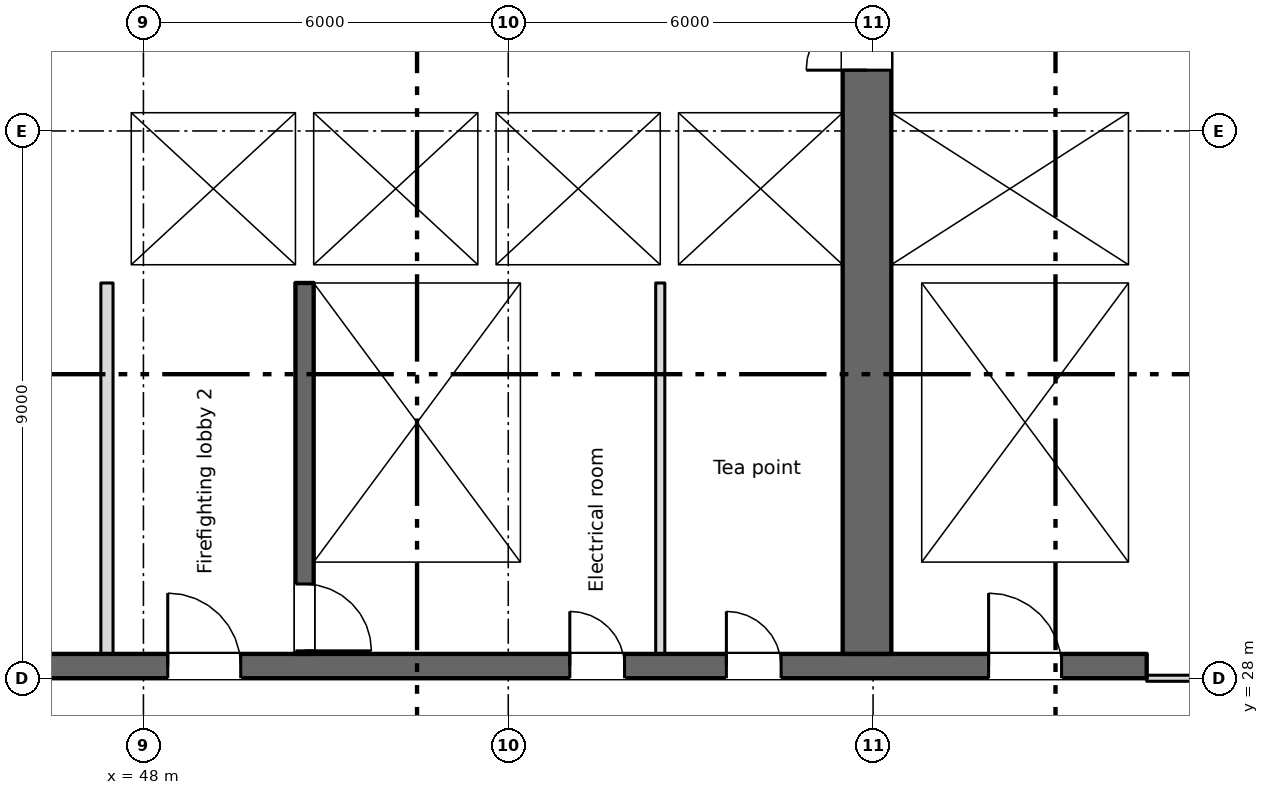
"""IFC4 building model, lengths in metres.
Left out: names, types, materials, properties, quantities, classifications, styles, units other than length and angle.
Written with IfcOpenShell. Run it as: python <this file> out.ifc"""

import sys

from ifc_helpers import new_model, si_unit, direction, frame, frame_2d, origin, place, context, subcontext, project, spatial, rectangle, extrude, element, fill, save


model = new_model("IFC4")
c1 = context("Model", 3, precision=1e-05, world=origin(), true_north=direction((0.0, 1.0)))
c2 = subcontext(c1, "Body", "Model", "MODEL_VIEW")
j1 = project(units=[si_unit("LENGTHUNIT", "METRE"), si_unit("PLANEANGLEUNIT", "RADIAN")], contexts=[c1])
p1 = place(None, origin())
s1 = spatial("IfcSite", under=j1, at=p1, CompositionType="ELEMENT")
p2 = place(p1, origin())
s2 = spatial("IfcBuilding", under=s1, at=p2, CompositionType="ELEMENT")
p3 = place(p2, frame((0.0, 0.0, 136.25)))
s3 = spatial("IfcBuildingStorey", under=s2, at=p3, CompositionType="ELEMENT", Elevation=136.25)
p4 = place(p3, frame((6.7, 28.2, 0.0), z_axis=(0.0, 0.0, 1.0), x_axis=(1.0, 0.0, 0.0)))
e1 = element("IfcWall", 1, at=p4, inside=s3, PredefinedType="SHEAR", context=c2, shape_type="SweptSolid", body=[
    extrude(rectangle(XDim=57.8, YDim=0.4, at=frame_2d((28.9, 0.0))), origin(), (0.0, 0.0, 1.0), 3.35),
])
p5 = place(p4, frame((12.812, 0.0, 0.0)))
e2 = element("IfcOpeningElement", 2, at=p5, cuts=e1, PredefinedType="OPENING", context=c2, shape_type="SweptSolid", body=[
    extrude(rectangle(XDim=0.9, YDim=2.1, at=frame_2d((0.45, 1.05))), frame((0.0, 0.21, 0.0), z_axis=(0.0, -1.0, 0.0), x_axis=(1.0, 0.0, 0.0)), (0.0, 0.0, 1.0), 0.42),
])
p6 = place(p4, frame((15.387, 0.0, 0.0)))
e3 = element("IfcOpeningElement", 3, at=p6, cuts=e1, PredefinedType="OPENING", context=c2, shape_type="SweptSolid", body=[
    extrude(rectangle(XDim=0.9, YDim=2.1, at=frame_2d((0.45, 1.05))), frame((0.0, 0.21, 0.0), z_axis=(0.0, -1.0, 0.0), x_axis=(1.0, 0.0, 0.0)), (0.0, 0.0, 1.0), 0.42),
])
p7 = place(p4, frame((48.312, 0.0, 0.0)))
e4 = element("IfcOpeningElement", 4, at=p7, cuts=e1, PredefinedType="OPENING", context=c2, shape_type="SweptSolid", body=[
    extrude(rectangle(XDim=0.9, YDim=2.1, at=frame_2d((0.45, 1.05))), frame((0.0, 0.21, 0.0), z_axis=(0.0, -1.0, 0.0), x_axis=(1.0, 0.0, 0.0)), (0.0, 0.0, 1.0), 0.42),
])
p8 = place(p4, frame((50.887, 0.0, 0.0)))
e5 = element("IfcOpeningElement", 5, at=p8, cuts=e1, PredefinedType="OPENING", context=c2, shape_type="SweptSolid", body=[
    extrude(rectangle(XDim=0.9, YDim=2.1, at=frame_2d((0.45, 1.05))), frame((0.0, 0.21, 0.0), z_axis=(0.0, -1.0, 0.0), x_axis=(1.0, 0.0, 0.0)), (0.0, 0.0, 1.0), 0.42),
])
p9 = place(p4, frame((0.562, 0.0, 0.0)))
e6 = element("IfcOpeningElement", 6, at=p9, cuts=e1, PredefinedType="OPENING", context=c2, shape_type="SweptSolid", body=[
    extrude(rectangle(XDim=0.9, YDim=2.1, at=frame_2d((0.45, 1.05))), frame((0.0, 0.21, 0.0), z_axis=(0.0, -1.0, 0.0), x_axis=(1.0, 0.0, 0.0)), (0.0, 0.0, 1.0), 0.42),
])
p10 = place(p4, frame((2.137, 0.0, 0.0)))
e7 = element("IfcOpeningElement", 7, at=p10, cuts=e1, PredefinedType="OPENING", context=c2, shape_type="SweptSolid", body=[
    extrude(rectangle(XDim=0.9, YDim=2.1, at=frame_2d((0.45, 1.05))), frame((0.0, 0.21, 0.0), z_axis=(0.0, -1.0, 0.0), x_axis=(1.0, 0.0, 0.0)), (0.0, 0.0, 1.0), 0.42),
])
p11 = place(p4, frame((4.7, 0.0, 0.0)))
e8 = element("IfcOpeningElement", 8, at=p11, cuts=e1, PredefinedType="OPENING", context=c2, shape_type="SweptSolid", body=[
    extrude(rectangle(XDim=1.2, YDim=2.1, at=frame_2d((0.6, 1.05))), frame((0.0, 0.21, 0.0), z_axis=(0.0, -1.0, 0.0), x_axis=(1.0, 0.0, 0.0)), (0.0, 0.0, 1.0), 0.42),
])
p12 = place(p4, frame((31.7, 0.0, 0.0)))
e9 = element("IfcOpeningElement", 9, at=p12, cuts=e1, PredefinedType="OPENING", context=c2, shape_type="SweptSolid", body=[
    extrude(rectangle(XDim=1.2, YDim=2.1, at=frame_2d((0.6, 1.05))), frame((0.0, 0.21, 0.0), z_axis=(0.0, -1.0, 0.0), x_axis=(1.0, 0.0, 0.0)), (0.0, 0.0, 1.0), 0.42),
])
p13 = place(p4, frame((55.2, 0.0, 0.0)))
e10 = element("IfcOpeningElement", 10, at=p13, cuts=e1, PredefinedType="OPENING", context=c2, shape_type="SweptSolid", body=[
    extrude(rectangle(XDim=1.2, YDim=2.1, at=frame_2d((0.6, 1.05))), frame((0.0, 0.21, 0.0), z_axis=(0.0, -1.0, 0.0), x_axis=(1.0, 0.0, 0.0)), (0.0, 0.0, 1.0), 0.42),
])
p14 = place(p4, frame((21.7, 0.0, 0.0)))
e11 = element("IfcOpeningElement", 11, at=p14, cuts=e1, PredefinedType="OPENING", context=c2, shape_type="SweptSolid", body=[
    extrude(rectangle(XDim=1.2, YDim=2.1, at=frame_2d((0.6, 1.05))), frame((0.0, 0.21, 0.0), z_axis=(0.0, -1.0, 0.0), x_axis=(1.0, 0.0, 0.0)), (0.0, 0.0, 1.0), 0.42),
])
p15 = place(p4, frame((41.7, 0.0, 0.0)))
e12 = element("IfcOpeningElement", 12, at=p15, cuts=e1, PredefinedType="OPENING", context=c2, shape_type="SweptSolid", body=[
    extrude(rectangle(XDim=1.2, YDim=2.1, at=frame_2d((0.6, 1.05))), frame((0.0, 0.21, 0.0), z_axis=(0.0, -1.0, 0.0), x_axis=(1.0, 0.0, 0.0)), (0.0, 0.0, 1.0), 0.42),
])
p16 = place(p4, frame((24.85, 0.0, 0.0)))
e13 = element("IfcOpeningElement", 13, at=p16, cuts=e1, PredefinedType="OPENING", context=c2, shape_type="SweptSolid", body=[
    extrude(rectangle(XDim=2.4, YDim=2.1, at=frame_2d((1.2, 1.05))), frame((0.0, 0.21, 0.0), z_axis=(0.0, -1.0, 0.0), x_axis=(1.0, 0.0, 0.0)), (0.0, 0.0, 1.0), 0.42),
])
p17 = place(p4, frame((37.35, 0.0, 0.0)))
e14 = element("IfcOpeningElement", 14, at=p17, cuts=e1, PredefinedType="OPENING", context=c2, shape_type="SweptSolid", body=[
    extrude(rectangle(XDim=2.4, YDim=2.1, at=frame_2d((1.2, 1.05))), frame((0.0, 0.21, 0.0), z_axis=(0.0, -1.0, 0.0), x_axis=(1.0, 0.0, 0.0)), (0.0, 0.0, 1.0), 0.42),
])
p18 = place(p4, frame((7.95, 0.0, 0.0)))
e15 = element("IfcOpeningElement", 15, at=p18, cuts=e1, PredefinedType="OPENING", context=c2, shape_type="SweptSolid", body=[
    extrude(rectangle(XDim=2.4, YDim=2.1, at=frame_2d((1.2, 1.05))), frame((0.0, 0.21, 0.0), z_axis=(0.0, -1.0, 0.0), x_axis=(1.0, 0.0, 0.0)), (0.0, 0.0, 1.0), 0.42),
])
p19 = place(p4, frame((28.85, 0.0, 0.0)))
e16 = element("IfcOpeningElement", 16, at=p19, cuts=e1, PredefinedType="OPENING", context=c2, shape_type="SweptSolid", body=[
    extrude(rectangle(XDim=0.9, YDim=2.1, at=frame_2d((0.45, 1.05))), frame((0.0, 0.21, 0.0), z_axis=(0.0, -1.0, 0.0), x_axis=(1.0, 0.0, 0.0)), (0.0, 0.0, 1.0), 0.42),
])
p20 = place(p4, frame((34.85, 0.0, 0.0)))
e17 = element("IfcOpeningElement", 17, at=p20, cuts=e1, PredefinedType="OPENING", context=c2, shape_type="SweptSolid", body=[
    extrude(rectangle(XDim=0.9, YDim=2.1, at=frame_2d((0.45, 1.05))), frame((0.0, 0.21, 0.0), z_axis=(0.0, -1.0, 0.0), x_axis=(1.0, 0.0, 0.0)), (0.0, 0.0, 1.0), 0.42),
])
p21 = place(p3, frame((64.35, 34.8, 0.0), z_axis=(0.0, 0.0, 1.0), x_axis=(0.0, 1.0, 0.0)))
e18 = element("IfcWall", 18, at=p21, inside=s3, PredefinedType="SHEAR", context=c2, shape_type="SweptSolid", body=[
    extrude(rectangle(XDim=10.4, YDim=0.3, at=frame_2d((5.2, 0.0))), origin(), (0.0, 0.0, 1.0), 3.35),
])
p22 = place(p3, frame((59.9, 28.4, 0.0), z_axis=(0.0, 0.0, 1.0), x_axis=(0.0, 1.0, 0.0)))
e19 = element("IfcWall", 19, at=p22, inside=s3, PredefinedType="SHEAR", context=c2, shape_type="SweptSolid", body=[
    extrude(rectangle(XDim=16.8, YDim=0.8, at=frame_2d((8.4, 0.0))), origin(), (0.0, 0.0, 1.0), 3.35),
])
p23 = place(p22, frame((9.6, 0.0, 0.0)))
e20 = element("IfcOpeningElement", 20, at=p23, cuts=e19, PredefinedType="OPENING", context=c2, shape_type="SweptSolid", body=[
    extrude(rectangle(XDim=2.0, YDim=2.1, at=frame_2d((1.0, 1.05))), frame((0.0, 0.41, 0.0), z_axis=(0.0, -1.0, 0.0), x_axis=(1.0, 0.0, 0.0)), (0.0, 0.0, 1.0), 0.82),
])
p24 = place(p22, frame((15.35, 0.0, 0.0)))
e21 = element("IfcOpeningElement", 21, at=p24, cuts=e19, PredefinedType="OPENING", context=c2, shape_type="SweptSolid", body=[
    extrude(rectangle(XDim=1.2, YDim=2.1, at=frame_2d((0.6, 1.05))), frame((0.0, 0.41, 0.0), z_axis=(0.0, -1.0, 0.0), x_axis=(1.0, 0.0, 0.0)), (0.0, 0.0, 1.0), 0.82),
])
p25 = place(p3, frame((50.65, 34.5, 0.0), z_axis=(0.0, 0.0, 1.0), x_axis=(0.0, -1.0, 0.0)))
e22 = element("IfcWall", 22, at=p25, inside=s3, PredefinedType="SHEAR", context=c2, shape_type="SweptSolid", body=[
    extrude(rectangle(XDim=6.1, YDim=0.3, at=frame_2d((3.05, 0.0))), origin(), (0.0, 0.0, 1.0), 3.35),
])
p26 = place(p25, frame((4.95, 0.0, 0.0)))
e23 = element("IfcOpeningElement", 23, at=p26, cuts=e22, PredefinedType="OPENING", context=c2, shape_type="SweptSolid", body=[
    extrude(rectangle(XDim=1.1, YDim=2.1, at=frame_2d((0.55, 1.05))), frame((0.0, 0.16, 0.0), z_axis=(0.0, -1.0, 0.0), x_axis=(1.0, 0.0, 0.0)), (0.0, 0.0, 1.0), 0.32),
])
p27 = place(p3, frame((54.35, 28.4, 0.0), z_axis=(0.0, 0.0, 1.0), x_axis=(0.0, 1.0, 0.0)))
e24 = element("IfcWall", 24, at=p27, inside=s3, PredefinedType="SHEAR", context=c2, shape_type="SweptSolid", body=[
    extrude(rectangle(XDim=6.1, YDim=0.3, at=frame_2d((3.05, 0.0))), origin(), (0.0, 0.0, 1.0), 3.35),
])
p28 = place(p3, frame((60.55, 28.4, 0.0), z_axis=(0.0, 0.0, 1.0), x_axis=(0.0, 1.0, 0.0)))
e25 = element("IfcWall", 25, at=p28, inside=s3, PredefinedType="SHEAR", context=c2, shape_type="SweptSolid", body=[
    extrude(rectangle(XDim=6.1, YDim=0.5, at=frame_2d((3.05, 0.0))), origin(), (0.0, 0.0, 1.0), 3.35),
])
p29 = place(p3, frame((64.35, 28.4, 0.0), z_axis=(0.0, 0.0, 1.0), x_axis=(0.0, 1.0, 0.0)))
e26 = element("IfcWall", 26, at=p29, inside=s3, PredefinedType="SHEAR", context=c2, shape_type="SweptSolid", body=[
    extrude(rectangle(XDim=6.1, YDim=0.3, at=frame_2d((3.05, 0.0))), origin(), (0.0, 0.0, 1.0), 3.35),
])
p30 = place(p3, frame((47.3, 34.65, 0.0), z_axis=(0.0, 0.0, 1.0), x_axis=(1.0, 0.0, 0.0)))
e27 = element("IfcWall", 27, at=p30, inside=s3, PredefinedType="SHEAR", context=c2, shape_type="SweptSolid", body=[
    extrude(rectangle(XDim=12.2, YDim=0.3, at=frame_2d((6.1, 0.0))), origin(), (0.0, 0.0, 1.0), 3.35),
])
p31 = place(p30, frame((1.3, 0.0, 0.0)))
e28 = element("IfcOpeningElement", 28, at=p31, cuts=e27, PredefinedType="OPENING", context=c2, shape_type="SweptSolid", body=[
    extrude(rectangle(XDim=1.1, YDim=2.1, at=frame_2d((0.55, 1.05))), frame((0.0, 0.16, 0.0), z_axis=(0.0, -1.0, 0.0), x_axis=(1.0, 0.0, 0.0)), (0.0, 0.0, 1.0), 0.32),
])
p32 = place(p3, frame((60.3, 34.65, 0.0), z_axis=(0.0, 0.0, 1.0), x_axis=(1.0, 0.0, 0.0)))
e29 = element("IfcWall", 29, at=p32, inside=s3, PredefinedType="SHEAR", context=c2, shape_type="SweptSolid", body=[
    extrude(rectangle(XDim=4.2, YDim=0.3, at=frame_2d((2.1, 0.0))), origin(), (0.0, 0.0, 1.0), 3.35),
])
p33 = place(p3, frame((47.3, 37.45, 0.0), z_axis=(0.0, 0.0, 1.0), x_axis=(1.0, 0.0, 0.0)))
e30 = element("IfcWall", 30, at=p33, inside=s3, PredefinedType="SHEAR", context=c2, shape_type="SweptSolid", body=[
    extrude(rectangle(XDim=12.2, YDim=0.3, at=frame_2d((6.1, 0.0))), origin(), (0.0, 0.0, 1.0), 3.35),
])
p34 = place(p33, frame((4.3, 0.0, 0.0)))
e31 = element("IfcOpeningElement", 31, at=p34, cuts=e30, PredefinedType="OPENING", context=c2, shape_type="SweptSolid", body=[
    extrude(rectangle(XDim=1.1, YDim=2.1, at=frame_2d((0.55, 1.05))), frame((0.0, 0.16, 0.0), z_axis=(0.0, -1.0, 0.0), x_axis=(1.0, 0.0, 0.0)), (0.0, 0.0, 1.0), 0.32),
])
p35 = place(p33, frame((7.3, 0.0, 0.0)))
e32 = element("IfcOpeningElement", 32, at=p35, cuts=e30, PredefinedType="OPENING", context=c2, shape_type="SweptSolid", body=[
    extrude(rectangle(XDim=1.1, YDim=2.1, at=frame_2d((0.55, 1.05))), frame((0.0, 0.16, 0.0), z_axis=(0.0, -1.0, 0.0), x_axis=(1.0, 0.0, 0.0)), (0.0, 0.0, 1.0), 0.32),
])
p36 = place(p33, frame((10.3, 0.0, 0.0)))
e33 = element("IfcOpeningElement", 33, at=p36, cuts=e30, PredefinedType="OPENING", context=c2, shape_type="SweptSolid", body=[
    extrude(rectangle(XDim=1.1, YDim=2.1, at=frame_2d((0.55, 1.05))), frame((0.0, 0.16, 0.0), z_axis=(0.0, -1.0, 0.0), x_axis=(1.0, 0.0, 0.0)), (0.0, 0.0, 1.0), 0.32),
])
p37 = place(p3, frame((60.3, 37.45, 0.0), z_axis=(0.0, 0.0, 1.0), x_axis=(1.0, 0.0, 0.0)))
e34 = element("IfcWall", 34, at=p37, inside=s3, PredefinedType="SHEAR", context=c2, shape_type="SweptSolid", body=[
    extrude(rectangle(XDim=3.9, YDim=0.3, at=frame_2d((1.95, 0.0))), origin(), (0.0, 0.0, 1.0), 3.35),
])
p38 = place(p37, frame((1.4, 0.0, 0.0)))
e35 = element("IfcOpeningElement", 35, at=p38, cuts=e34, PredefinedType="OPENING", context=c2, shape_type="SweptSolid", body=[
    extrude(rectangle(XDim=1.1, YDim=2.1, at=frame_2d((0.55, 1.05))), frame((0.0, 0.16, 0.0), z_axis=(0.0, -1.0, 0.0), x_axis=(1.0, 0.0, 0.0)), (0.0, 0.0, 1.0), 0.32),
])
p39 = place(p3, frame((47.55, 34.8, 0.0), z_axis=(0.0, 0.0, 1.0), x_axis=(0.0, 1.0, 0.0)))
e36 = element("IfcWall", 36, at=p39, inside=s3, PredefinedType="SHEAR", context=c2, shape_type="SweptSolid", body=[
    extrude(rectangle(XDim=2.5, YDim=0.5, at=frame_2d((1.25, 0.0))), origin(), (0.0, 0.0, 1.0), 3.35),
])
for number, where, z_axis, x_axis in (
    (37, (50.65, 34.8, 0.0), (0.0, 0.0, 1.0), (0.0, 1.0, 0.0)),
    (38, (53.65, 34.8, 0.0), (0.0, 0.0, 1.0), (0.0, 1.0, 0.0)),
    (39, (56.65, 34.8, 0.0), (0.0, 0.0, 1.0), (0.0, 1.0, 0.0)),
):
    element("IfcWall", number, at=place(p3, frame(where, z_axis=z_axis, x_axis=x_axis)), inside=s3, PredefinedType="SHEAR", context=c2, shape_type="SweptSolid", body=[
        extrude(rectangle(XDim=2.5, YDim=0.3, at=frame_2d((1.25, 0.0))), origin(), (0.0, 0.0, 1.0), 3.35),
    ])
p40 = place(p3, frame((47.4, 28.4, 0.0), z_axis=(0.0, 0.0, 1.0), x_axis=(0.0, 1.0, 0.0)))
e40 = element("IfcWall", 40, at=p40, inside=s3, PredefinedType="PARTITIONING", context=c2, shape_type="SweptSolid", body=[
    extrude(rectangle(XDim=6.1, YDim=0.2, at=frame_2d((3.05, 0.0))), origin(), (0.0, 0.0, 1.0), 3.35),
])
p41 = place(p3, frame((56.5, 28.4, 0.0), z_axis=(0.0, 0.0, 1.0), x_axis=(0.0, 1.0, 0.0)))
e41 = element("IfcWall", 41, at=p41, inside=s3, PredefinedType="PARTITIONING", context=c2, shape_type="SweptSolid", body=[
    extrude(rectangle(XDim=6.1, YDim=0.15, at=frame_2d((3.05, 0.0))), origin(), (0.0, 0.0, 1.0), 3.35),
])
p42 = place(p3, frame((64.5, 28.0, 0.0), z_axis=(0.0, 0.0, 1.0), x_axis=(1.0, 0.0, 0.0)))
e42 = element("IfcWall", 42, at=p42, inside=s3, PredefinedType="PARTITIONING", context=c2, shape_type="SweptSolid", body=[
    extrude(rectangle(XDim=6.8, YDim=0.1, at=frame_2d((3.4, 0.0))), origin(), (0.0, 0.0, 1.0), 3.35),
])
p43 = place(p42, frame((2.5, 0.0, 0.0)))
e43 = element("IfcOpeningElement", 43, at=p43, cuts=e42, PredefinedType="OPENING", context=c2, shape_type="SweptSolid", body=[
    extrude(rectangle(XDim=1.8, YDim=2.1, at=frame_2d((0.9, 1.05))), frame((0.0, 0.06, 0.0), z_axis=(0.0, -1.0, 0.0), x_axis=(1.0, 0.0, 0.0)), (0.0, 0.0, 1.0), 0.12),
])
p44 = place(p7, origin())
e44 = element("IfcDoor", 44, at=p44, inside=s3, OperationType="SINGLE_SWING_LEFT", PredefinedType="DOOR", context=c2, shape_type="SweptSolid", body=[
    extrude(rectangle(XDim=0.9, YDim=2.1, at=frame_2d((0.45, 1.05))), frame((0.0, 0.025, 0.0), z_axis=(0.0, -1.0, 0.0), x_axis=(1.0, 0.0, 0.0)), (0.0, 0.0, 1.0), 0.05),
])
fill(e4, e44)
p45 = place(p8, origin())
e45 = element("IfcDoor", 45, at=p45, inside=s3, OperationType="SINGLE_SWING_LEFT", PredefinedType="DOOR", context=c2, shape_type="SweptSolid", body=[
    extrude(rectangle(XDim=0.9, YDim=2.1, at=frame_2d((0.45, 1.05))), frame((0.0, 0.025, 0.0), z_axis=(0.0, -1.0, 0.0), x_axis=(1.0, 0.0, 0.0)), (0.0, 0.0, 1.0), 0.05),
])
fill(e5, e45)
p46 = place(p34, origin())
e46 = element("IfcDoor", 46, at=p46, inside=s3, OperationType="SLIDING_TO_LEFT", PredefinedType="DOOR", context=c2, shape_type="SweptSolid", body=[
    extrude(rectangle(XDim=1.1, YDim=2.1, at=frame_2d((0.55, 1.05))), frame((0.0, 0.025, 0.0), z_axis=(0.0, -1.0, 0.0), x_axis=(1.0, 0.0, 0.0)), (0.0, 0.0, 1.0), 0.05),
])
fill(e31, e46)
p47 = place(p35, origin())
e47 = element("IfcDoor", 47, at=p47, inside=s3, OperationType="SLIDING_TO_LEFT", PredefinedType="DOOR", context=c2, shape_type="SweptSolid", body=[
    extrude(rectangle(XDim=1.1, YDim=2.1, at=frame_2d((0.55, 1.05))), frame((0.0, 0.025, 0.0), z_axis=(0.0, -1.0, 0.0), x_axis=(1.0, 0.0, 0.0)), (0.0, 0.0, 1.0), 0.05),
])
fill(e32, e47)
p48 = place(p36, origin())
e48 = element("IfcDoor", 48, at=p48, inside=s3, OperationType="SLIDING_TO_LEFT", PredefinedType="DOOR", context=c2, shape_type="SweptSolid", body=[
    extrude(rectangle(XDim=1.1, YDim=2.1, at=frame_2d((0.55, 1.05))), frame((0.0, 0.025, 0.0), z_axis=(0.0, -1.0, 0.0), x_axis=(1.0, 0.0, 0.0)), (0.0, 0.0, 1.0), 0.05),
])
fill(e33, e48)
p49 = place(p38, origin())
e49 = element("IfcDoor", 49, at=p49, inside=s3, OperationType="SLIDING_TO_LEFT", PredefinedType="DOOR", context=c2, shape_type="SweptSolid", body=[
    extrude(rectangle(XDim=1.1, YDim=2.1, at=frame_2d((0.55, 1.05))), frame((0.0, 0.025, 0.0), z_axis=(0.0, -1.0, 0.0), x_axis=(1.0, 0.0, 0.0)), (0.0, 0.0, 1.0), 0.05),
])
fill(e35, e49)
p50 = place(p31, origin())
e50 = element("IfcDoor", 50, at=p50, inside=s3, OperationType="SLIDING_TO_LEFT", PredefinedType="DOOR", context=c2, shape_type="SweptSolid", body=[
    extrude(rectangle(XDim=1.1, YDim=2.1, at=frame_2d((0.55, 1.05))), frame((0.0, 0.025, 0.0), z_axis=(0.0, -1.0, 0.0), x_axis=(1.0, 0.0, 0.0)), (0.0, 0.0, 1.0), 0.05),
])
fill(e28, e50)
p51 = place(p26, origin())
e51 = element("IfcDoor", 51, at=p51, inside=s3, OperationType="SINGLE_SWING_RIGHT", PredefinedType="DOOR", context=c2, shape_type="SweptSolid", body=[
    extrude(rectangle(XDim=1.1, YDim=2.1, at=frame_2d((0.55, 1.05))), frame((0.0, 0.025, 0.0), z_axis=(0.0, -1.0, 0.0), x_axis=(1.0, 0.0, 0.0)), (0.0, 0.0, 1.0), 0.05),
])
fill(e23, e51)
p52 = place(p13, origin())
e52 = element("IfcDoor", 52, at=p52, inside=s3, OperationType="SINGLE_SWING_LEFT", PredefinedType="DOOR", context=c2, shape_type="SweptSolid", body=[
    extrude(rectangle(XDim=1.2, YDim=2.1, at=frame_2d((0.6, 1.05))), frame((0.0, 0.025, 0.0), z_axis=(0.0, -1.0, 0.0), x_axis=(1.0, 0.0, 0.0)), (0.0, 0.0, 1.0), 0.05),
])
fill(e10, e52)
p53 = place(p15, origin())
e53 = element("IfcDoor", 53, at=p53, inside=s3, OperationType="SINGLE_SWING_LEFT", PredefinedType="DOOR", context=c2, shape_type="SweptSolid", body=[
    extrude(rectangle(XDim=1.2, YDim=2.1, at=frame_2d((0.6, 1.05))), frame((0.0, 0.025, 0.0), z_axis=(0.0, -1.0, 0.0), x_axis=(1.0, 0.0, 0.0)), (0.0, 0.0, 1.0), 0.05),
])
fill(e12, e53)
p54 = place(p23, origin())
e54 = element("IfcDoor", 54, at=p54, inside=s3, OperationType="DOUBLE_DOOR_SINGLE_SWING", PredefinedType="DOOR", context=c2, shape_type="SweptSolid", body=[
    extrude(rectangle(XDim=2.0, YDim=2.1, at=frame_2d((1.0, 1.05))), frame((0.0, 0.025, 0.0), z_axis=(0.0, -1.0, 0.0), x_axis=(1.0, 0.0, 0.0)), (0.0, 0.0, 1.0), 0.05),
])
fill(e20, e54)
save(model, sys.argv[1])
